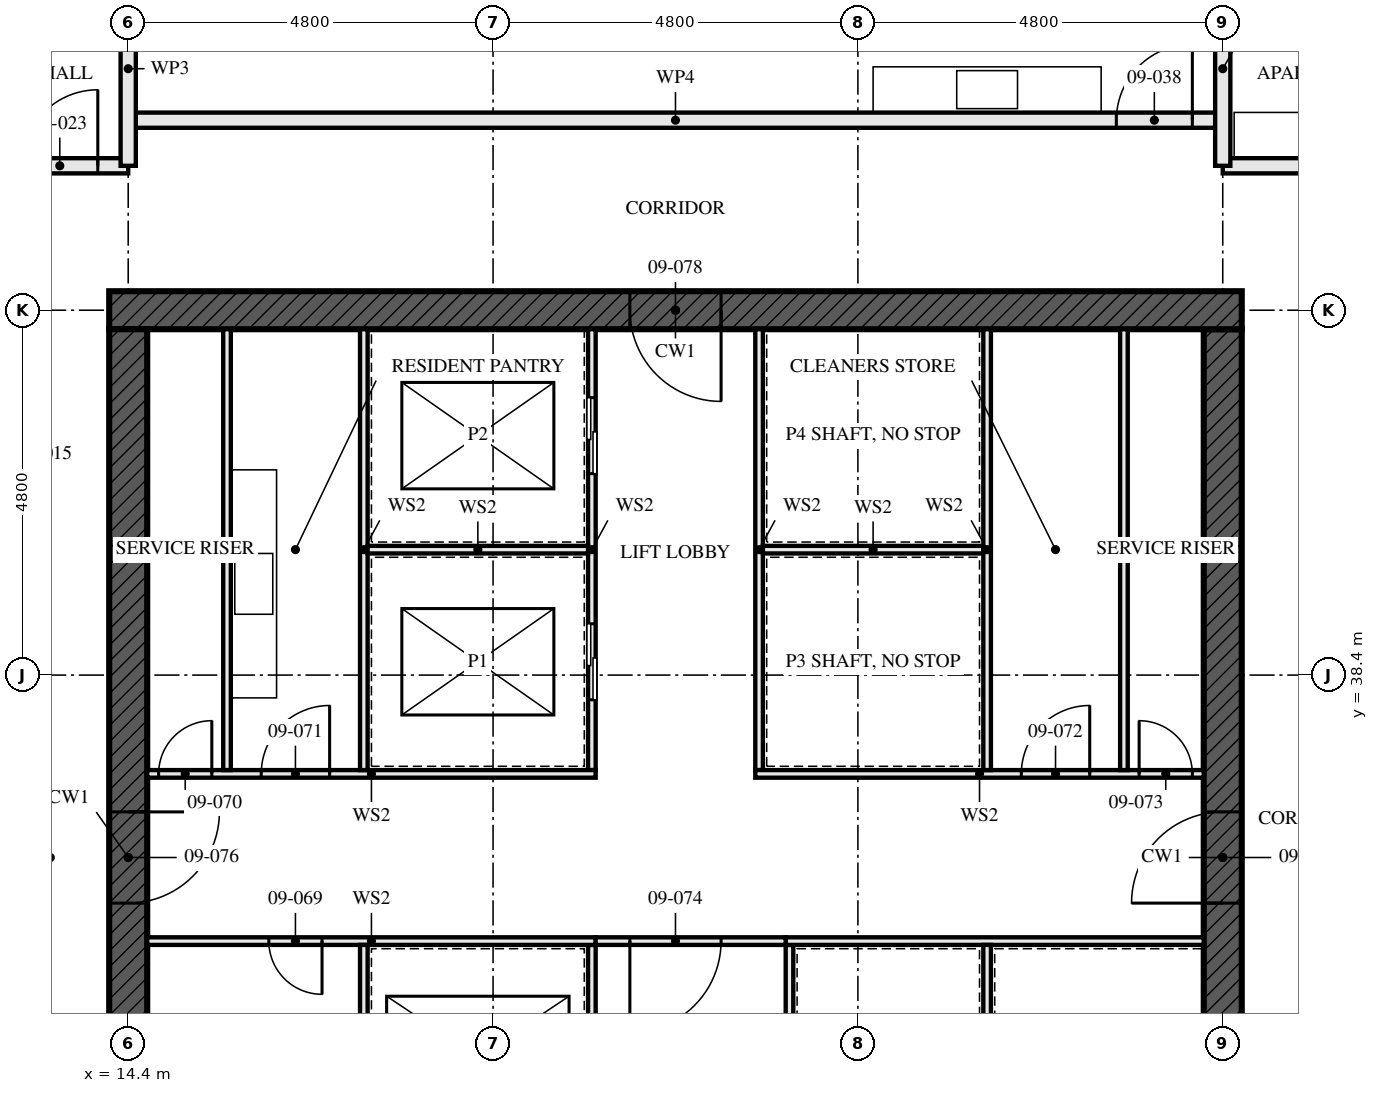
"""IFC4 building model, lengths in metres.
Left out: names, types, materials, properties, quantities, classifications, styles, units other than length and angle.
Written with IfcOpenShell. Run it as: python <this file> out.ifc"""

import sys

from ifc_helpers import new_model, si_unit, direction, frame, frame_2d, origin, place, context, subcontext, project, spatial, rectangle, extrude, element, fill, save


model = new_model("IFC4")
c1 = context("Model", 3, precision=1e-05, world=origin(), true_north=direction((0.0, 1.0)))
c2 = subcontext(c1, "Body", "Model", "MODEL_VIEW")
j1 = project(units=[si_unit("LENGTHUNIT", "METRE"), si_unit("PLANEANGLEUNIT", "RADIAN")], contexts=[c1])
p1 = place(None, origin())
s1 = spatial("IfcSite", under=j1, at=p1, CompositionType="ELEMENT")
p2 = place(p1, origin())
s2 = spatial("IfcBuilding", under=s1, at=p2, CompositionType="ELEMENT")
p3 = place(p2, frame((0.0, 0.0, 37.5)))
s3 = spatial("IfcBuildingStorey", under=s2, at=p3, CompositionType="ELEMENT", Elevation=37.5)
p4 = place(p3, frame((29.05, 43.2, -0.17), z_axis=(0.0, 0.0, 1.0), x_axis=(-1.0, 0.0, 0.0)))
e1 = element("IfcWall", 1, at=p4, inside=s3, PredefinedType="SHEAR", context=c2, shape_type="SweptSolid", body=[
    extrude(rectangle(XDim=14.9, YDim=0.5, at=frame_2d((7.45, 0.0))), origin(), (0.0, 0.0, 1.0), 3.5),
])
p5 = place(p4, frame((6.85, 0.0, 0.17)))
e2 = element("IfcOpeningElement", 2, at=p5, cuts=e1, PredefinedType="OPENING", context=c2, shape_type="SweptSolid", body=[
    extrude(rectangle(XDim=1.2, YDim=2.1, at=frame_2d((0.6, 1.05))), frame((0.0, 0.26, 0.0), z_axis=(0.0, -1.0, 0.0), x_axis=(1.0, 0.0, 0.0)), (0.0, 0.0, 1.0), 0.521),
])
p6 = place(p3, frame((14.4, 42.95, -0.17), z_axis=(0.0, 0.0, 1.0), x_axis=(0.0, -1.0, 0.0)))
e3 = element("IfcWall", 3, at=p6, inside=s3, PredefinedType="SHEAR", context=c2, shape_type="SweptSolid", body=[
    extrude(rectangle(XDim=13.9, YDim=0.5, at=frame_2d((6.95, 0.0))), origin(), (0.0, 0.0, 1.0), 3.5),
])
p7 = place(p6, frame((6.35, 0.0, 0.17)))
e4 = element("IfcOpeningElement", 4, at=p7, cuts=e3, PredefinedType="OPENING", context=c2, shape_type="SweptSolid", body=[
    extrude(rectangle(XDim=1.2, YDim=2.1, at=frame_2d((0.6, 1.05))), frame((0.0, 0.26, 0.0), z_axis=(0.0, -1.0, 0.0), x_axis=(1.0, 0.0, 0.0)), (0.0, 0.0, 1.0), 0.521),
])
p8 = place(p3, frame((28.8, 29.05, -0.17), z_axis=(0.0, 0.0, 1.0), x_axis=(0.0, 1.0, 0.0)))
e5 = element("IfcWall", 5, at=p8, inside=s3, PredefinedType="SHEAR", context=c2, shape_type="SweptSolid", body=[
    extrude(rectangle(XDim=13.9, YDim=0.5, at=frame_2d((6.95, 0.0))), origin(), (0.0, 0.0, 1.0), 3.5),
])
p9 = place(p8, frame((6.35, 0.0, 0.17)))
e6 = element("IfcOpeningElement", 6, at=p9, cuts=e5, PredefinedType="OPENING", context=c2, shape_type="SweptSolid", body=[
    extrude(rectangle(XDim=1.2, YDim=2.1, at=frame_2d((0.6, 1.05))), frame((0.0, 0.26, 0.0), z_axis=(0.0, -1.0, 0.0), x_axis=(1.0, 0.0, 0.0)), (0.0, 0.0, 1.0), 0.521),
])
p10 = place(p3, frame((14.4, 45.1, 0.0), z_axis=(0.0, 0.0, 1.0), x_axis=(-1.0, 0.0, 0.0)))
e7 = element("IfcWall", 7, at=p10, inside=s3, PredefinedType="PARTITIONING", context=c2, shape_type="SweptSolid", body=[
    extrude(rectangle(XDim=9.6, YDim=0.2, at=frame_2d((4.8, 0.0))), origin(), (0.0, 0.0, 1.0), 3.33),
])
p11 = place(p10, frame((0.4, 0.0, 0.0)))
e8 = element("IfcOpeningElement", 8, at=p11, cuts=e7, PredefinedType="OPENING", context=c2, shape_type="SweptSolid", body=[
    extrude(rectangle(XDim=1.0, YDim=2.1, at=frame_2d((0.5, 1.05))), frame((0.0, 0.111, 0.0), z_axis=(0.0, -1.0, 0.0), x_axis=(1.0, 0.0, 0.0)), (0.0, 0.0, 1.0), 0.221),
])
p12 = place(p3, frame((28.8, 45.7, 0.0), z_axis=(0.0, 0.0, 1.0), x_axis=(-1.0, 0.0, 0.0)))
e9 = element("IfcWall", 9, at=p12, inside=s3, PredefinedType="PARTITIONING", context=c2, shape_type="SweptSolid", body=[
    extrude(rectangle(XDim=14.4, YDim=0.2, at=frame_2d((7.2, 0.0))), origin(), (0.0, 0.0, 1.0), 3.33),
])
p13 = place(p12, frame((0.4, 0.0, 0.0)))
e10 = element("IfcOpeningElement", 10, at=p13, cuts=e9, PredefinedType="OPENING", context=c2, shape_type="SweptSolid", body=[
    extrude(rectangle(XDim=1.0, YDim=2.1, at=frame_2d((0.5, 1.05))), frame((0.0, 0.111, 0.0), z_axis=(0.0, -1.0, 0.0), x_axis=(1.0, 0.0, 0.0)), (0.0, 0.0, 1.0), 0.221),
])
p14 = place(p3, frame((38.4, 45.1, 0.0), z_axis=(0.0, 0.0, 1.0), x_axis=(-1.0, 0.0, 0.0)))
e11 = element("IfcWall", 11, at=p14, inside=s3, PredefinedType="PARTITIONING", context=c2, shape_type="SweptSolid", body=[
    extrude(rectangle(XDim=9.6, YDim=0.2, at=frame_2d((4.8, 0.0))), origin(), (0.0, 0.0, 1.0), 3.33),
])
p15 = place(p14, frame((0.4, 0.0, 0.0)))
e12 = element("IfcOpeningElement", 12, at=p15, cuts=e11, PredefinedType="OPENING", context=c2, shape_type="SweptSolid", body=[
    extrude(rectangle(XDim=1.0, YDim=2.1, at=frame_2d((0.5, 1.05))), frame((0.0, 0.111, 0.0), z_axis=(0.0, -1.0, 0.0), x_axis=(1.0, 0.0, 0.0)), (0.0, 0.0, 1.0), 0.221),
])
p16 = place(p14, frame((5.2, 0.0, 0.0)))
e13 = element("IfcOpeningElement", 13, at=p16, cuts=e11, PredefinedType="OPENING", context=c2, shape_type="SweptSolid", body=[
    extrude(rectangle(XDim=1.0, YDim=2.1, at=frame_2d((0.5, 1.05))), frame((0.0, 0.111, 0.0), z_axis=(0.0, -1.0, 0.0), x_axis=(1.0, 0.0, 0.0)), (0.0, 0.0, 1.0), 0.221),
])
for number, where, z_axis, x_axis in (
    (14, (15.7, 37.15, 0.0), (0.0, 0.0, 1.0), (0.0, 1.0, 0.0)),
    (15, (27.5, 37.15, 0.0), (0.0, 0.0, 1.0), (0.0, 1.0, 0.0)),
):
    element("IfcWall", number, at=place(p3, frame(where, z_axis=z_axis, x_axis=x_axis)), inside=s3, PredefinedType="SOLIDWALL", context=c2, shape_type="SweptSolid", body=[
        extrude(rectangle(XDim=5.8, YDim=0.1, at=frame_2d((2.9, 0.0))), origin(), (0.0, 0.0, 1.0), 3.33),
    ])
p17 = place(p3, frame((20.5, 29.05, 0.0), z_axis=(0.0, 0.0, 1.0), x_axis=(0.0, 1.0, 0.0)))
e16 = element("IfcWall", 16, at=p17, inside=s3, PredefinedType="SOLIDWALL", context=c2, shape_type="SweptSolid", body=[
    extrude(rectangle(XDim=5.8, YDim=0.1, at=frame_2d((2.9, 0.0))), origin(), (0.0, 0.0, 1.0), 3.33),
])
p18 = place(p17, frame((0.8, 0.0, 0.0)))
e17 = element("IfcOpeningElement", 17, at=p18, cuts=e16, PredefinedType="OPENING", context=c2, shape_type="SweptSolid", body=[
    extrude(rectangle(XDim=1.1, YDim=2.3, at=frame_2d((0.55, 1.15))), frame((0.0, 0.061, 0.0), z_axis=(0.0, -1.0, 0.0), x_axis=(1.0, 0.0, 0.0)), (0.0, 0.0, 1.0), 0.121),
])
p19 = place(p17, frame((3.775, 0.0, 0.0)))
e18 = element("IfcOpeningElement", 18, at=p19, cuts=e16, PredefinedType="OPENING", context=c2, shape_type="SweptSolid", body=[
    extrude(rectangle(XDim=1.1, YDim=2.3, at=frame_2d((0.55, 1.15))), frame((0.0, 0.061, 0.0), z_axis=(0.0, -1.0, 0.0), x_axis=(1.0, 0.0, 0.0)), (0.0, 0.0, 1.0), 0.121),
])
p20 = place(p3, frame((20.5, 37.15, 0.0), z_axis=(0.0, 0.0, 1.0), x_axis=(0.0, 1.0, 0.0)))
e19 = element("IfcWall", 19, at=p20, inside=s3, PredefinedType="SOLIDWALL", context=c2, shape_type="SweptSolid", body=[
    extrude(rectangle(XDim=5.8, YDim=0.1, at=frame_2d((2.9, 0.0))), origin(), (0.0, 0.0, 1.0), 3.33),
])
p21 = place(p20, frame((0.925, 0.0, 0.0)))
e20 = element("IfcOpeningElement", 20, at=p21, cuts=e19, PredefinedType="OPENING", context=c2, shape_type="SweptSolid", body=[
    extrude(rectangle(XDim=1.0, YDim=2.1, at=frame_2d((0.5, 1.05))), frame((0.0, 0.061, 0.0), z_axis=(0.0, -1.0, 0.0), x_axis=(1.0, 0.0, 0.0)), (0.0, 0.0, 1.0), 0.121),
])
p22 = place(p20, frame((3.9, 0.0, 0.0)))
e21 = element("IfcOpeningElement", 21, at=p22, cuts=e19, PredefinedType="OPENING", context=c2, shape_type="SweptSolid", body=[
    extrude(rectangle(XDim=1.0, YDim=2.1, at=frame_2d((0.5, 1.05))), frame((0.0, 0.061, 0.0), z_axis=(0.0, -1.0, 0.0), x_axis=(1.0, 0.0, 0.0)), (0.0, 0.0, 1.0), 0.121),
])
p23 = place(p3, frame((22.7, 37.15, 0.0), z_axis=(0.0, 0.0, 1.0), x_axis=(0.0, 1.0, 0.0)))
e22 = element("IfcWall", 22, at=p23, inside=s3, PredefinedType="SOLIDWALL", context=c2, shape_type="SweptSolid", body=[
    extrude(rectangle(XDim=5.8, YDim=0.1, at=frame_2d((2.9, 0.0))), origin(), (0.0, 0.0, 1.0), 3.33),
])
p24 = place(p3, frame((23.1, 29.05, 0.0), z_axis=(0.0, 0.0, 1.0), x_axis=(0.0, 1.0, 0.0)))
e23 = element("IfcWall", 23, at=p24, inside=s3, PredefinedType="SOLIDWALL", context=c2, shape_type="SweptSolid", body=[
    extrude(rectangle(XDim=5.8, YDim=0.1, at=frame_2d((2.9, 0.0))), origin(), (0.0, 0.0, 1.0), 3.33),
])
p25 = place(p24, frame((1.0, 0.0, 0.0)))
e24 = element("IfcOpeningElement", 24, at=p25, cuts=e23, PredefinedType="OPENING", context=c2, shape_type="SweptSolid", body=[
    extrude(rectangle(XDim=0.7, YDim=2.1, at=frame_2d((0.35, 1.05))), frame((0.0, 0.061, 0.0), z_axis=(0.0, -1.0, 0.0), x_axis=(1.0, 0.0, 0.0)), (0.0, 0.0, 1.0), 0.121),
])
p26 = place(p3, frame((14.65, 34.9, 0.0), z_axis=(0.0, 0.0, 1.0), x_axis=(1.0, 0.0, 0.0)))
e25 = element("IfcWall", 25, at=p26, inside=s3, PredefinedType="SOLIDWALL", context=c2, shape_type="SweptSolid", body=[
    extrude(rectangle(XDim=5.9, YDim=0.1, at=frame_2d((2.95, 0.0))), origin(), (0.0, 0.0, 1.0), 3.33),
])
p27 = place(p26, frame((1.6, 0.0, 0.0)))
e26 = element("IfcOpeningElement", 26, at=p27, cuts=e25, PredefinedType="OPENING", context=c2, shape_type="SweptSolid", body=[
    extrude(rectangle(XDim=0.7, YDim=2.1, at=frame_2d((0.35, 1.05))), frame((0.0, 0.061, 0.0), z_axis=(0.0, -1.0, 0.0), x_axis=(1.0, 0.0, 0.0)), (0.0, 0.0, 1.0), 0.121),
])
p28 = place(p3, frame((23.05, 34.9, 0.0), z_axis=(0.0, 0.0, 1.0), x_axis=(1.0, 0.0, 0.0)))
e27 = element("IfcWall", 27, at=p28, inside=s3, PredefinedType="SOLIDWALL", context=c2, shape_type="SweptSolid", body=[
    extrude(rectangle(XDim=5.5, YDim=0.1, at=frame_2d((2.75, 0.0))), origin(), (0.0, 0.0, 1.0), 3.33),
])
p29 = place(p3, frame((14.65, 37.1, 0.0), z_axis=(0.0, 0.0, 1.0), x_axis=(1.0, 0.0, 0.0)))
e28 = element("IfcWall", 28, at=p29, inside=s3, PredefinedType="SOLIDWALL", context=c2, shape_type="SweptSolid", body=[
    extrude(rectangle(XDim=5.9, YDim=0.1, at=frame_2d((2.95, 0.0))), origin(), (0.0, 0.0, 1.0), 3.33),
])
p30 = place(p29, frame((0.15, 0.0, 0.0)))
e29 = element("IfcOpeningElement", 29, at=p30, cuts=e28, PredefinedType="OPENING", context=c2, shape_type="SweptSolid", body=[
    extrude(rectangle(XDim=0.7, YDim=2.1, at=frame_2d((0.35, 1.05))), frame((0.0, 0.061, 0.0), z_axis=(0.0, -1.0, 0.0), x_axis=(1.0, 0.0, 0.0)), (0.0, 0.0, 1.0), 0.121),
])
p31 = place(p29, frame((1.5, 0.0, 0.0)))
e30 = element("IfcOpeningElement", 30, at=p31, cuts=e28, PredefinedType="OPENING", context=c2, shape_type="SweptSolid", body=[
    extrude(rectangle(XDim=0.9, YDim=2.1, at=frame_2d((0.45, 1.05))), frame((0.0, 0.061, 0.0), z_axis=(0.0, -1.0, 0.0), x_axis=(1.0, 0.0, 0.0)), (0.0, 0.0, 1.0), 0.121),
])
p32 = place(p3, frame((22.65, 37.1, 0.0), z_axis=(0.0, 0.0, 1.0), x_axis=(1.0, 0.0, 0.0)))
e31 = element("IfcWall", 31, at=p32, inside=s3, PredefinedType="SOLIDWALL", context=c2, shape_type="SweptSolid", body=[
    extrude(rectangle(XDim=5.9, YDim=0.1, at=frame_2d((2.95, 0.0))), origin(), (0.0, 0.0, 1.0), 3.33),
])
p33 = place(p32, frame((3.5, 0.0, 0.0)))
e32 = element("IfcOpeningElement", 32, at=p33, cuts=e31, PredefinedType="OPENING", context=c2, shape_type="SweptSolid", body=[
    extrude(rectangle(XDim=0.9, YDim=2.1, at=frame_2d((0.45, 1.05))), frame((0.0, 0.061, 0.0), z_axis=(0.0, -1.0, 0.0), x_axis=(1.0, 0.0, 0.0)), (0.0, 0.0, 1.0), 0.121),
])
p34 = place(p32, frame((5.05, 0.0, 0.0)))
e33 = element("IfcOpeningElement", 33, at=p34, cuts=e31, PredefinedType="OPENING", context=c2, shape_type="SweptSolid", body=[
    extrude(rectangle(XDim=0.7, YDim=2.1, at=frame_2d((0.35, 1.05))), frame((0.0, 0.061, 0.0), z_axis=(0.0, -1.0, 0.0), x_axis=(1.0, 0.0, 0.0)), (0.0, 0.0, 1.0), 0.121),
])
p35 = place(p3, frame((20.55, 34.9, 0.0), z_axis=(0.0, 0.0, 1.0), x_axis=(1.0, 0.0, 0.0)))
e34 = element("IfcWall", 34, at=p35, inside=s3, PredefinedType="SOLIDWALL", context=c2, shape_type="SweptSolid", body=[
    extrude(rectangle(XDim=2.5, YDim=0.1, at=frame_2d((1.25, 0.0))), origin(), (0.0, 0.0, 1.0), 3.33),
])
p36 = place(p35, frame((0.45, 0.0, 0.0)))
e35 = element("IfcOpeningElement", 35, at=p36, cuts=e34, PredefinedType="OPENING", context=c2, shape_type="SweptSolid", body=[
    extrude(rectangle(XDim=1.2, YDim=2.1, at=frame_2d((0.6, 1.05))), frame((0.0, 0.061, 0.0), z_axis=(0.0, -1.0, 0.0), x_axis=(1.0, 0.0, 0.0)), (0.0, 0.0, 1.0), 0.121),
])
for number, where, z_axis, x_axis in (
    (36, (17.5, 29.05, 0.0), (0.0, 0.0, 1.0), (0.0, 1.0, 0.0)),
    (37, (17.5, 37.15, 0.0), (0.0, 0.0, 1.0), (0.0, 1.0, 0.0)),
):
    element("IfcWall", number, at=place(p3, frame(where, z_axis=z_axis, x_axis=x_axis)), inside=s3, PredefinedType="SOLIDWALL", context=c2, shape_type="SweptSolid", body=[
        extrude(rectangle(XDim=5.8, YDim=0.1, at=frame_2d((2.9, 0.0))), origin(), (0.0, 0.0, 1.0), 3.33),
    ])
for number, where, z_axis, x_axis in (
    (38, (17.55, 40.05, 0.0), (0.0, 0.0, 1.0), (1.0, 0.0, 0.0)),
    (39, (22.75, 40.05, 0.0), (0.0, 0.0, 1.0), (1.0, 0.0, 0.0)),
):
    element("IfcWall", number, at=place(p3, frame(where, z_axis=z_axis, x_axis=x_axis)), inside=s3, PredefinedType="SOLIDWALL", context=c2, shape_type="SweptSolid", body=[
        extrude(rectangle(XDim=2.9, YDim=0.1, at=frame_2d((1.45, 0.0))), origin(), (0.0, 0.0, 1.0), 3.33),
    ])
p37 = place(p3, frame((25.7, 37.15, 0.0), z_axis=(0.0, 0.0, 1.0), x_axis=(0.0, 1.0, 0.0)))
e40 = element("IfcWall", 40, at=p37, inside=s3, PredefinedType="SOLIDWALL", context=c2, shape_type="SweptSolid", body=[
    extrude(rectangle(XDim=5.8, YDim=0.1, at=frame_2d((2.9, 0.0))), origin(), (0.0, 0.0, 1.0), 3.33),
])
p38 = place(p3, frame((25.7, 31.95, 0.0), z_axis=(0.0, 0.0, 1.0), x_axis=(0.0, 1.0, 0.0)))
e41 = element("IfcWall", 41, at=p38, inside=s3, PredefinedType="SOLIDWALL", context=c2, shape_type="SweptSolid", body=[
    extrude(rectangle(XDim=2.9, YDim=0.1, at=frame_2d((1.45, 0.0))), origin(), (0.0, 0.0, 1.0), 3.33),
])
for number, where, z_axis, x_axis in (
    (42, (14.4, 45.1, 0.0), (0.0, 0.0, 1.0), (0.0, 1.0, 0.0)),
    (43, (28.8, 45.1, 0.0), (0.0, 0.0, 1.0), (0.0, 1.0, 0.0)),
):
    element("IfcWall", number, at=place(p3, frame(where, z_axis=z_axis, x_axis=x_axis)), inside=s3, PredefinedType="PARTITIONING", context=c2, shape_type="SweptSolid", body=[
        extrude(rectangle(XDim=2.555, YDim=0.2, at=frame_2d((1.277, 0.0))), origin(), (0.0, 0.0, 1.0), 2.32),
    ])
p39 = place(p11, frame((1.0, 0.0, 0.0), z_axis=(0.0, 0.0, 1.0), x_axis=(-1.0, 0.0, 0.0)))
e44 = element("IfcDoor", 44, at=p39, inside=s3, OperationType="SINGLE_SWING_LEFT", PredefinedType="DOOR", context=c2, shape_type="SweptSolid", body=[
    extrude(rectangle(XDim=1.0, YDim=2.1, at=frame_2d((0.5, 1.05))), frame((0.0, 0.027, 0.0), z_axis=(0.0, -1.0, 0.0), x_axis=(1.0, 0.0, 0.0)), (0.0, 0.0, 1.0), 0.054),
])
fill(e8, e44)
p40 = place(p13, frame((1.0, 0.0, 0.0), z_axis=(0.0, 0.0, 1.0), x_axis=(-1.0, 0.0, 0.0)))
e45 = element("IfcDoor", 45, at=p40, inside=s3, OperationType="SINGLE_SWING_LEFT", PredefinedType="DOOR", context=c2, shape_type="SweptSolid", body=[
    extrude(rectangle(XDim=1.0, YDim=2.1, at=frame_2d((0.5, 1.05))), frame((0.0, 0.027, 0.0), z_axis=(0.0, -1.0, 0.0), x_axis=(1.0, 0.0, 0.0)), (0.0, 0.0, 1.0), 0.054),
])
fill(e10, e45)
p41 = place(p21, origin())
e46 = element("IfcDoor", 46, at=p41, inside=s3, OperationType="SLIDING_TO_LEFT", PredefinedType="DOOR", context=c2, shape_type="SweptSolid", body=[
    extrude(rectangle(XDim=1.0, YDim=2.1, at=frame_2d((0.5, 1.05))), frame((0.0, 0.05, 0.0), z_axis=(0.0, -1.0, 0.0), x_axis=(1.0, 0.0, 0.0)), (0.0, 0.0, 1.0), 0.1),
])
fill(e20, e46)
p42 = place(p22, origin())
e47 = element("IfcDoor", 47, at=p42, inside=s3, OperationType="SLIDING_TO_LEFT", PredefinedType="DOOR", context=c2, shape_type="SweptSolid", body=[
    extrude(rectangle(XDim=1.0, YDim=2.1, at=frame_2d((0.5, 1.05))), frame((0.0, 0.05, 0.0), z_axis=(0.0, -1.0, 0.0), x_axis=(1.0, 0.0, 0.0)), (0.0, 0.0, 1.0), 0.1),
])
fill(e21, e47)
p43 = place(p27, frame((0.7, 0.0, 0.0), z_axis=(0.0, 0.0, 1.0), x_axis=(-1.0, 0.0, 0.0)))
e48 = element("IfcDoor", 48, at=p43, inside=s3, OperationType="SINGLE_SWING_RIGHT", PredefinedType="DOOR", context=c2, shape_type="SweptSolid", body=[
    extrude(rectangle(XDim=0.7, YDim=2.1, at=frame_2d((0.35, 1.05))), frame((0.0, 0.027, 0.0), z_axis=(0.0, -1.0, 0.0), x_axis=(1.0, 0.0, 0.0)), (0.0, 0.0, 1.0), 0.054),
])
fill(e26, e48)
p44 = place(p30, origin())
e49 = element("IfcDoor", 49, at=p44, inside=s3, OperationType="SINGLE_SWING_LEFT", PredefinedType="DOOR", context=c2, shape_type="SweptSolid", body=[
    extrude(rectangle(XDim=0.7, YDim=2.1, at=frame_2d((0.35, 1.05))), frame((0.0, 0.027, 0.0), z_axis=(0.0, -1.0, 0.0), x_axis=(1.0, 0.0, 0.0)), (0.0, 0.0, 1.0), 0.054),
])
fill(e29, e49)
p45 = place(p31, origin())
e50 = element("IfcDoor", 50, at=p45, inside=s3, OperationType="SINGLE_SWING_LEFT", PredefinedType="DOOR", context=c2, shape_type="SweptSolid", body=[
    extrude(rectangle(XDim=0.9, YDim=2.1, at=frame_2d((0.45, 1.05))), frame((0.0, 0.027, 0.0), z_axis=(0.0, -1.0, 0.0), x_axis=(1.0, 0.0, 0.0)), (0.0, 0.0, 1.0), 0.054),
])
fill(e30, e50)
p46 = place(p33, origin())
e51 = element("IfcDoor", 51, at=p46, inside=s3, OperationType="SINGLE_SWING_LEFT", PredefinedType="DOOR", context=c2, shape_type="SweptSolid", body=[
    extrude(rectangle(XDim=0.9, YDim=2.1, at=frame_2d((0.45, 1.05))), frame((0.0, 0.027, 0.0), z_axis=(0.0, -1.0, 0.0), x_axis=(1.0, 0.0, 0.0)), (0.0, 0.0, 1.0), 0.054),
])
fill(e32, e51)
p47 = place(p34, origin())
e52 = element("IfcDoor", 52, at=p47, inside=s3, OperationType="SINGLE_SWING_RIGHT", PredefinedType="DOOR", context=c2, shape_type="SweptSolid", body=[
    extrude(rectangle(XDim=0.7, YDim=2.1, at=frame_2d((0.35, 1.05))), frame((0.0, 0.027, 0.0), z_axis=(0.0, -1.0, 0.0), x_axis=(1.0, 0.0, 0.0)), (0.0, 0.0, 1.0), 0.054),
])
fill(e33, e52)
p48 = place(p36, frame((1.2, 0.0, 0.0), z_axis=(0.0, 0.0, 1.0), x_axis=(-1.0, 0.0, 0.0)))
e53 = element("IfcDoor", 53, at=p48, inside=s3, OperationType="SINGLE_SWING_LEFT", PredefinedType="DOOR", context=c2, shape_type="SweptSolid", body=[
    extrude(rectangle(XDim=1.2, YDim=2.1, at=frame_2d((0.6, 1.05))), frame((0.0, 0.027, 0.0), z_axis=(0.0, -1.0, 0.0), x_axis=(1.0, 0.0, 0.0)), (0.0, 0.0, 1.0), 0.054),
])
fill(e35, e53)
p49 = place(p7, origin())
e54 = element("IfcDoor", 54, at=p49, inside=s3, OperationType="SINGLE_SWING_LEFT", PredefinedType="DOOR", context=c2, shape_type="SweptSolid", body=[
    extrude(rectangle(XDim=1.2, YDim=2.1, at=frame_2d((0.6, 1.05))), frame((0.0, 0.027, 0.0), z_axis=(0.0, -1.0, 0.0), x_axis=(1.0, 0.0, 0.0)), (0.0, 0.0, 1.0), 0.054),
])
fill(e4, e54)
p50 = place(p9, origin())
e55 = element("IfcDoor", 55, at=p50, inside=s3, OperationType="SINGLE_SWING_LEFT", PredefinedType="DOOR", context=c2, shape_type="SweptSolid", body=[
    extrude(rectangle(XDim=1.2, YDim=2.1, at=frame_2d((0.6, 1.05))), frame((0.0, 0.027, 0.0), z_axis=(0.0, -1.0, 0.0), x_axis=(1.0, 0.0, 0.0)), (0.0, 0.0, 1.0), 0.054),
])
fill(e6, e55)
p51 = place(p5, origin())
e56 = element("IfcDoor", 56, at=p51, inside=s3, OperationType="SINGLE_SWING_LEFT", PredefinedType="DOOR", context=c2, shape_type="SweptSolid", body=[
    extrude(rectangle(XDim=1.2, YDim=2.1, at=frame_2d((0.6, 1.05))), frame((0.0, 0.027, 0.0), z_axis=(0.0, -1.0, 0.0), x_axis=(1.0, 0.0, 0.0)), (0.0, 0.0, 1.0), 0.054),
])
fill(e2, e56)
save(model, sys.argv[1])
